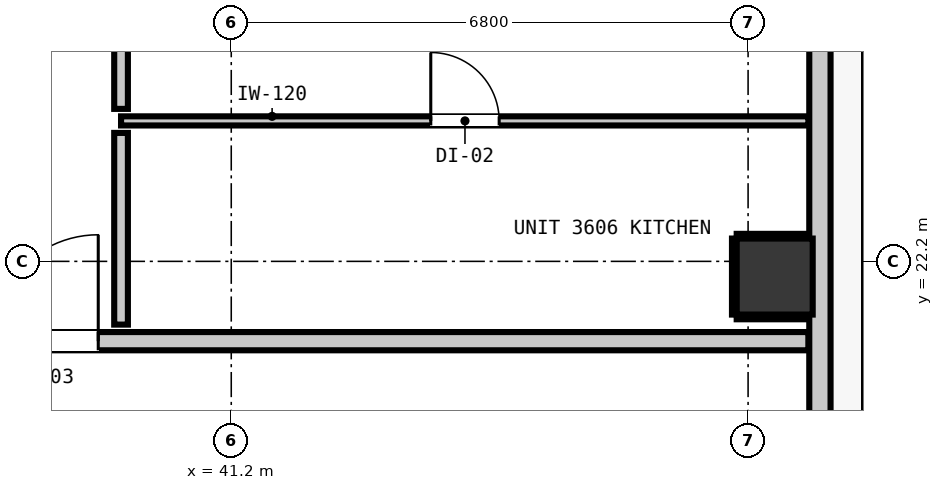
"""IFC4 building model, lengths in metres.
Left out: names, types, materials, properties, quantities, classifications, styles, units other than length and angle.
Written with IfcOpenShell. Run it as: python <this file> out.ifc"""

import sys

from ifc_helpers import new_model, si_unit, direction, frame, frame_2d, origin, origin_2d, place, context, subcontext, project, spatial, rectangle, extrude, element, fill, save


model = new_model("IFC4")
c1 = context("Model", 3, precision=1e-05, world=origin(), true_north=direction((0.0, 1.0)))
c2 = subcontext(c1, "Body", "Model", "MODEL_VIEW")
j1 = project(units=[si_unit("LENGTHUNIT", "METRE"), si_unit("PLANEANGLEUNIT", "RADIAN")], contexts=[c1])
p1 = place(None, origin())
s1 = spatial("IfcSite", under=j1, at=p1, CompositionType="ELEMENT")
p2 = place(p1, origin())
s2 = spatial("IfcBuilding", under=s1, at=p2, CompositionType="ELEMENT")
p3 = place(p2, frame((0.0, 0.0, 126.0)))
s3 = spatial("IfcBuildingStorey", under=s2, at=p3, CompositionType="ELEMENT", Elevation=126.0)
p4 = place(p3, frame((48.35, 22.0, -0.2), z_axis=(0.0, 0.0, 1.0), x_axis=(1.0, 0.0, 0.0)))
e1 = element("IfcColumn", 1, at=p4, inside=s3, PredefinedType="COLUMN", context=c2, shape_type="SweptSolid", body=[
    extrude(rectangle(XDim=1.0, YDim=1.0, at=origin_2d()), origin(), (0.0, 0.0, 1.0), 3.52),
])
p5 = place(p3, frame((48.945, 43.645, 0.0), z_axis=(0.0, 0.0, 1.0), x_axis=(0.0, -1.0, 0.0)))
e2 = element("IfcWall", 2, at=p5, inside=s3, PredefinedType="STANDARD", context=c2, shape_type="SweptSolid", body=[
    extrude(rectangle(XDim=32.29, YDim=0.28, at=frame_2d((16.145, 0.0))), origin(), (0.0, 0.0, 1.0), 3.08),
])
p6 = place(p5, frame((6.52, 0.0, 0.0)))
e3 = element("IfcOpeningElement", 3, at=p6, cuts=e2, PredefinedType="OPENING", context=c2, shape_type="SweptSolid", body=[
    extrude(rectangle(XDim=1.0, YDim=2.15, at=frame_2d((0.5, 1.075))), frame((0.0, 0.15, 0.0), z_axis=(0.0, -1.0, 0.0), x_axis=(1.0, 0.0, 0.0)), (0.0, 0.0, 1.0), 0.3),
])
p7 = place(p5, frame((0.318, 0.0, 0.85)))
e4 = element("IfcOpeningElement", 4, at=p7, cuts=e2, PredefinedType="OPENING", context=c2, shape_type="SweptSolid", body=[
    extrude(rectangle(XDim=1.05, YDim=1.65, at=frame_2d((0.525, 0.825))), frame((0.0, 0.15, 0.0), z_axis=(0.0, -1.0, 0.0), x_axis=(1.0, 0.0, 0.0)), (0.0, 0.0, 1.0), 0.3),
])
p8 = place(p5, frame((16.674, 0.0, 0.85)))
e5 = element("IfcOpeningElement", 5, at=p8, cuts=e2, PredefinedType="OPENING", context=c2, shape_type="SweptSolid", body=[
    extrude(rectangle(XDim=1.5, YDim=1.8, at=frame_2d((0.75, 0.9))), frame((0.0, 0.15, 0.0), z_axis=(0.0, -1.0, 0.0), x_axis=(1.0, 0.0, 0.0)), (0.0, 0.0, 1.0), 0.3),
])
p9 = place(p5, frame((13.773, 0.0, 0.85)))
e6 = element("IfcOpeningElement", 6, at=p9, cuts=e2, PredefinedType="OPENING", context=c2, shape_type="SweptSolid", body=[
    extrude(rectangle(XDim=1.05, YDim=1.65, at=frame_2d((0.525, 0.825))), frame((0.0, 0.15, 0.0), z_axis=(0.0, -1.0, 0.0), x_axis=(1.0, 0.0, 0.0)), (0.0, 0.0, 1.0), 0.3),
])
p10 = place(p5, frame((7.907, 0.0, 0.85)))
e7 = element("IfcOpeningElement", 7, at=p10, cuts=e2, PredefinedType="OPENING", context=c2, shape_type="SweptSolid", body=[
    extrude(rectangle(XDim=1.5, YDim=1.8, at=frame_2d((0.75, 0.9))), frame((0.0, 0.15, 0.0), z_axis=(0.0, -1.0, 0.0), x_axis=(1.0, 0.0, 0.0)), (0.0, 0.0, 1.0), 0.3),
])
p11 = place(p5, frame((5.043, 0.0, 0.85)))
e8 = element("IfcOpeningElement", 8, at=p11, cuts=e2, PredefinedType="OPENING", context=c2, shape_type="SweptSolid", body=[
    extrude(rectangle(XDim=0.58, YDim=1.5, at=frame_2d((0.29, 0.75))), frame((0.0, 0.15, 0.0), z_axis=(0.0, -1.0, 0.0), x_axis=(1.0, 0.0, 0.0)), (0.0, 0.0, 1.0), 0.3),
])
p12 = place(p3, frame((9.407, 21.15, 0.0), z_axis=(0.0, 0.0, 1.0), x_axis=(1.0, 0.0, 0.0)))
e9 = element("IfcWall", 9, at=p12, inside=s3, PredefinedType="PARTITIONING", context=c2, shape_type="SweptSolid", body=[
    extrude(rectangle(XDim=39.386, YDim=0.24, at=frame_2d((19.693, 0.0))), origin(), (0.0, 0.0, 1.0), 3.08),
])
p13 = place(p12, frame((8.803, 0.0, 0.0)))
e10 = element("IfcOpeningElement", 10, at=p13, cuts=e9, PredefinedType="OPENING", context=c2, shape_type="SweptSolid", body=[
    extrude(rectangle(XDim=1.1, YDim=2.15, at=frame_2d((0.55, 1.075))), frame((0.0, 0.13, 0.0), z_axis=(0.0, -1.0, 0.0), x_axis=(1.0, 0.0, 0.0)), (0.0, 0.0, 1.0), 0.26),
])
p14 = place(p12, frame((1.192, 0.0, 0.0)))
e11 = element("IfcOpeningElement", 11, at=p14, cuts=e9, PredefinedType="OPENING", context=c2, shape_type="SweptSolid", body=[
    extrude(rectangle(XDim=1.4, YDim=2.15, at=frame_2d((0.7, 1.075))), frame((0.0, 0.13, 0.0), z_axis=(0.0, -1.0, 0.0), x_axis=(1.0, 0.0, 0.0)), (0.0, 0.0, 1.0), 0.26),
])
p15 = place(p12, frame((28.643, 0.0, 0.0)))
e12 = element("IfcOpeningElement", 12, at=p15, cuts=e9, PredefinedType="OPENING", context=c2, shape_type="SweptSolid", body=[
    extrude(rectangle(XDim=1.4, YDim=2.15, at=frame_2d((0.7, 1.075))), frame((0.0, 0.13, 0.0), z_axis=(0.0, -1.0, 0.0), x_axis=(1.0, 0.0, 0.0)), (0.0, 0.0, 1.0), 0.26),
])
p16 = place(p3, frame((39.75, 24.048, 0.0), z_axis=(0.0, 0.0, 1.0), x_axis=(1.0, 0.0, 0.0)))
e13 = element("IfcWall", 13, at=p16, inside=s3, PredefinedType="PARTITIONING", context=c2, shape_type="SweptSolid", body=[
    extrude(rectangle(XDim=9.043, YDim=0.12, at=frame_2d((4.521, 0.0))), origin(), (0.0, 0.0, 1.0), 3.08),
])
p17 = place(p16, frame((4.075, 0.0, 0.0)))
e14 = element("IfcOpeningElement", 14, at=p17, cuts=e13, PredefinedType="OPENING", context=c2, shape_type="SweptSolid", body=[
    extrude(rectangle(XDim=0.9, YDim=2.1, at=frame_2d((0.45, 1.05))), frame((0.0, 0.07, 0.0), z_axis=(0.0, -1.0, 0.0), x_axis=(1.0, 0.0, 0.0)), (0.0, 0.0, 1.0), 0.14),
])
p18 = place(p3, frame((39.75, 21.368, 0.0), z_axis=(0.0, 0.0, 1.0), x_axis=(0.0, 1.0, 0.0)))
e15 = element("IfcWall", 15, at=p18, inside=s3, PredefinedType="PARTITIONING", context=c2, shape_type="SweptSolid", body=[
    extrude(rectangle(XDim=2.522, YDim=0.18, at=frame_2d((1.261, 0.0))), origin(), (0.0, 0.0, 1.0), 3.08),
])
p19 = place(p3, frame((39.75, 24.206, 0.0), z_axis=(0.0, 0.0, 1.0), x_axis=(0.0, 1.0, 0.0)))
e16 = element("IfcWall", 16, at=p19, inside=s3, PredefinedType="PARTITIONING", context=c2, shape_type="SweptSolid", body=[
    extrude(rectangle(XDim=3.976, YDim=0.18, at=frame_2d((1.988, 0.0))), origin(), (0.0, 0.0, 1.0), 3.08),
])
p20 = place(p19, frame((1.515, 0.0, 0.0)))
e17 = element("IfcOpeningElement", 17, at=p20, cuts=e16, PredefinedType="OPENING", context=c2, shape_type="SweptSolid", body=[
    extrude(rectangle(XDim=1.0, YDim=2.15, at=frame_2d((0.5, 1.075))), frame((0.0, 0.1, 0.0), z_axis=(0.0, -1.0, 0.0), x_axis=(1.0, 0.0, 0.0)), (0.0, 0.0, 1.0), 0.2),
])
for number, where, z_axis, x_axis in (
    (18, (47.85, 21.468, 0.0), (0.0, 0.0, 1.0), (1.0, 0.0, 0.0)),
    (19, (47.85, 22.532, 0.0), (0.0, 0.0, 1.0), (1.0, 0.0, 0.0)),
):
    element("IfcWall", number, at=place(p3, frame(where, z_axis=z_axis, x_axis=x_axis)), inside=s3, PredefinedType="PARTITIONING", context=c2, shape_type="SweptSolid", body=[
        extrude(rectangle(XDim=0.94, YDim=0.06, at=frame_2d((0.47, 0.0))), origin(), (0.0, 0.0, 1.0), 1.45),
    ])
p21 = place(p3, frame((47.818, 21.5, 0.0), z_axis=(0.0, 0.0, 1.0), x_axis=(0.0, 1.0, 0.0)))
e20 = element("IfcWall", 20, at=p21, inside=s3, PredefinedType="PARTITIONING", context=c2, shape_type="SweptSolid", body=[
    extrude(rectangle(XDim=1.0, YDim=0.06, at=frame_2d((0.5, 0.0))), origin(), (0.0, 0.0, 1.0), 1.45),
])
p22 = place(p15, origin())
e21 = element("IfcDoor", 21, at=p22, inside=s3, OperationType="SINGLE_SWING_RIGHT", PredefinedType="DOOR", context=c2, shape_type="SweptSolid", body=[
    extrude(rectangle(XDim=1.4, YDim=2.15, at=frame_2d((0.7, 1.075))), frame((0.0, 0.025, 0.0), z_axis=(0.0, -1.0, 0.0), x_axis=(1.0, 0.0, 0.0)), (0.0, 0.0, 1.0), 0.05),
])
fill(e12, e21)
p23 = place(p17, origin())
e22 = element("IfcDoor", 22, at=p23, inside=s3, OperationType="SINGLE_SWING_LEFT", PredefinedType="DOOR", context=c2, shape_type="SweptSolid", body=[
    extrude(rectangle(XDim=0.9, YDim=2.1, at=frame_2d((0.45, 1.05))), frame((0.0, 0.025, 0.0), z_axis=(0.0, -1.0, 0.0), x_axis=(1.0, 0.0, 0.0)), (0.0, 0.0, 1.0), 0.05),
])
fill(e14, e22)
save(model, sys.argv[1])
